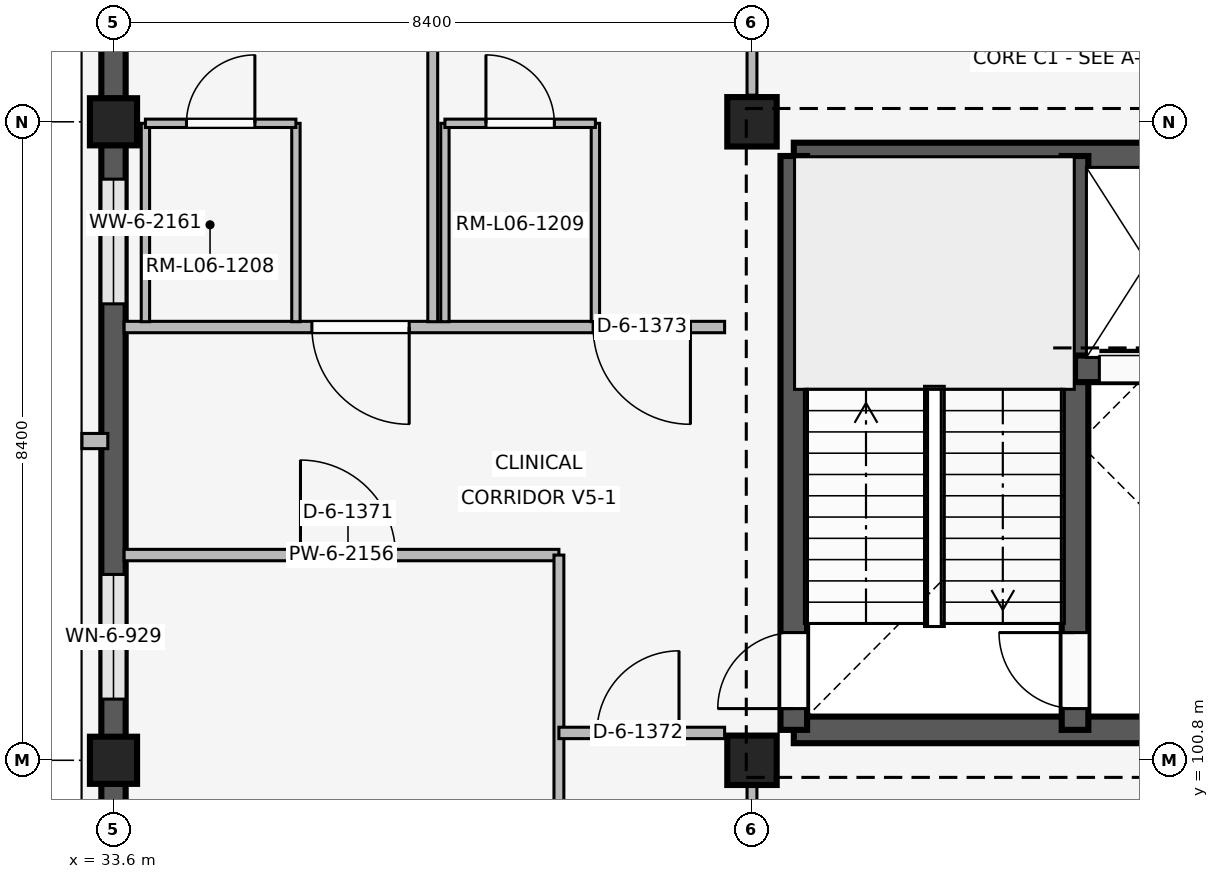
"""IFC4 building model, lengths in metres.
Left out: names, types, materials, properties, quantities, classifications, styles, units other than length and angle.
Written with IfcOpenShell. Run it as: python <this file> out.ifc"""

import sys

from ifc_helpers import new_model, si_unit, direction, frame, frame_2d, origin, origin_2d, place, context, subcontext, project, spatial, rectangle, extrude, element, fill, save


model = new_model("IFC4")
c1 = context("Model", 3, precision=1e-05, world=origin(), true_north=direction((0.0, 1.0)))
c2 = subcontext(c1, "Body", "Model", "MODEL_VIEW")
j1 = project(units=[si_unit("LENGTHUNIT", "METRE"), si_unit("PLANEANGLEUNIT", "RADIAN")], contexts=[c1])
p1 = place(None, origin())
s1 = spatial("IfcSite", under=j1, at=p1, CompositionType="ELEMENT")
p2 = place(p1, origin())
s2 = spatial("IfcBuilding", under=s1, at=p2, CompositionType="ELEMENT")
p3 = place(p2, frame((0.0, 0.0, 24.6)))
s3 = spatial("IfcBuildingStorey", under=s2, at=p3, CompositionType="ELEMENT", Elevation=24.6)
for number, where, z_axis, x_axis in (
    (1, (33.6, 100.8, 0.0), (0.0, 0.0, 1.0), (1.0, 0.0, 0.0)),
    (2, (33.6, 109.2, 0.0), (0.0, 0.0, 1.0), (1.0, 0.0, 0.0)),
):
    element("IfcColumn", number, at=place(p3, frame(where, z_axis=z_axis, x_axis=x_axis)), inside=s3, PredefinedType="COLUMN", context=c2, shape_type="SweptSolid", body=[
        extrude(rectangle(XDim=0.62, YDim=0.62, at=origin_2d()), origin(), (0.0, 0.0, 1.0), 4.2),
    ])
for number, where, z_axis, x_axis in (
    (3, (42.0, 100.8, 0.0), (0.0, 0.0, 1.0), (1.0, 0.0, 0.0)),
    (4, (42.0, 109.2, 0.0), (0.0, 0.0, 1.0), (1.0, 0.0, 0.0)),
):
    element("IfcColumn", number, at=place(p3, frame(where, z_axis=z_axis, x_axis=x_axis)), inside=s3, PredefinedType="COLUMN", context=c2, shape_type="SweptSolid", body=[
        extrude(rectangle(XDim=0.65, YDim=0.65, at=origin_2d()), origin(), (0.0, 0.0, 1.0), 4.2),
    ])
p4 = place(p3, frame((33.6, 92.705, 0.0), z_axis=(0.0, 0.0, 1.0), x_axis=(0.0, 1.0, 0.0)))
e5 = element("IfcWall", 5, at=p4, inside=s3, PredefinedType="SOLIDWALL", context=c2, shape_type="SweptSolid", body=[
    extrude(rectangle(XDim=7.79, YDim=0.32, at=frame_2d((3.895, 0.0))), origin(), (0.0, 0.0, 1.0), 3.34),
])
p5 = place(p4, frame((1.242, 0.0, 0.85)))
e6 = element("IfcOpeningElement", 6, at=p5, cuts=e5, PredefinedType="OPENING", context=c2, shape_type="SweptSolid", body=[
    extrude(rectangle(XDim=1.1, YDim=1.6, at=frame_2d((0.55, 0.8))), frame((0.0, 0.17, 0.0), z_axis=(0.0, -1.0, 0.0), x_axis=(1.0, 0.0, 0.0)), (0.0, 0.0, 1.0), 0.34),
])
p6 = place(p4, frame((5.448, 0.0, 0.85)))
e7 = element("IfcOpeningElement", 7, at=p6, cuts=e5, PredefinedType="OPENING", context=c2, shape_type="SweptSolid", body=[
    extrude(rectangle(XDim=1.1, YDim=1.6, at=frame_2d((0.55, 0.8))), frame((0.0, 0.17, 0.0), z_axis=(0.0, -1.0, 0.0), x_axis=(1.0, 0.0, 0.0)), (0.0, 0.0, 1.0), 0.34),
])
p7 = place(p3, frame((33.6, 101.105, 0.0), z_axis=(0.0, 0.0, 1.0), x_axis=(0.0, 1.0, 0.0)))
e8 = element("IfcWall", 8, at=p7, inside=s3, PredefinedType="SOLIDWALL", context=c2, shape_type="SweptSolid", body=[
    extrude(rectangle(XDim=7.79, YDim=0.32, at=frame_2d((3.895, 0.0))), origin(), (0.0, 0.0, 1.0), 3.34),
])
p8 = place(p7, frame((0.5, 0.0, 0.85)))
e9 = element("IfcOpeningElement", 9, at=p8, cuts=e8, PredefinedType="OPENING", context=c2, shape_type="SweptSolid", body=[
    extrude(rectangle(XDim=1.64, YDim=1.75, at=frame_2d((0.82, 0.875))), frame((0.0, 0.17, 0.0), z_axis=(0.0, -1.0, 0.0), x_axis=(1.0, 0.0, 0.0)), (0.0, 0.0, 1.0), 0.34),
])
p9 = place(p7, frame((5.7, 0.0, 0.85)))
e10 = element("IfcOpeningElement", 10, at=p9, cuts=e8, PredefinedType="OPENING", context=c2, shape_type="SweptSolid", body=[
    extrude(rectangle(XDim=1.64, YDim=1.75, at=frame_2d((0.82, 0.875))), frame((0.0, 0.17, 0.0), z_axis=(0.0, -1.0, 0.0), x_axis=(1.0, 0.0, 0.0)), (0.0, 0.0, 1.0), 0.34),
])
p10 = place(p3, frame((33.525, 105.0, 0.0), z_axis=(0.0, 0.0, 1.0), x_axis=(-1.0, 0.0, 0.0)))
e11 = element("IfcWall", 11, at=p10, inside=s3, PredefinedType="ELEMENTEDWALL", context=c2, shape_type="SweptSolid", body=[
    extrude(rectangle(XDim=0.34, YDim=0.2, at=frame_2d((0.17, 0.0))), origin(), (0.0, 0.0, 1.0), 3.32),
])
p11 = place(p3, frame((33.6, 109.505, 0.0), z_axis=(0.0, 0.0, 1.0), x_axis=(0.0, 1.0, 0.0)))
e12 = element("IfcWall", 12, at=p11, inside=s3, PredefinedType="SOLIDWALL", context=c2, shape_type="SweptSolid", body=[
    extrude(rectangle(XDim=7.79, YDim=0.32, at=frame_2d((3.895, 0.0))), origin(), (0.0, 0.0, 1.0), 3.34),
])
p12 = place(p11, frame((1.002, 0.0, 0.85)))
e13 = element("IfcOpeningElement", 13, at=p12, cuts=e12, PredefinedType="OPENING", context=c2, shape_type="SweptSolid", body=[
    extrude(rectangle(XDim=1.58, YDim=1.7, at=frame_2d((0.79, 0.85))), frame((0.0, 0.17, 0.0), z_axis=(0.0, -1.0, 0.0), x_axis=(1.0, 0.0, 0.0)), (0.0, 0.0, 1.0), 0.34),
])
p13 = place(p11, frame((5.208, 0.0, 0.85)))
e14 = element("IfcOpeningElement", 14, at=p13, cuts=e12, PredefinedType="OPENING", context=c2, shape_type="SweptSolid", body=[
    extrude(rectangle(XDim=1.58, YDim=1.7, at=frame_2d((0.79, 0.85))), frame((0.0, 0.17, 0.0), z_axis=(0.0, -1.0, 0.0), x_axis=(1.0, 0.0, 0.0)), (0.0, 0.0, 1.0), 0.34),
])
p14 = place(p3, frame((42.55, 101.2, 0.0), z_axis=(0.0, 0.0, 1.0), x_axis=(1.0, 0.0, 0.0)))
e15 = element("IfcWall", 15, at=p14, inside=s3, PredefinedType="SHEAR", context=c2, shape_type="SweptSolid", body=[
    extrude(rectangle(XDim=7.5, YDim=0.35, at=frame_2d((3.75, 0.0))), origin(), (0.0, 0.0, 1.0), 3.92),
])
p15 = place(p14, frame((4.85, 0.0, 0.0)))
e16 = element("IfcOpeningElement", 16, at=p15, cuts=e15, PredefinedType="OPENING", context=c2, shape_type="SweptSolid", body=[
    extrude(rectangle(XDim=1.2, YDim=2.2, at=frame_2d((0.6, 1.1))), frame((0.0, 0.185, 0.0), z_axis=(0.0, -1.0, 0.0), x_axis=(1.0, 0.0, 0.0)), (0.0, 0.0, 1.0), 0.37),
])
p16 = place(p3, frame((42.55, 108.75, 0.0), z_axis=(0.0, 0.0, 1.0), x_axis=(1.0, 0.0, 0.0)))
e17 = element("IfcWall", 17, at=p16, inside=s3, PredefinedType="SHEAR", context=c2, shape_type="SweptSolid", body=[
    extrude(rectangle(XDim=7.5, YDim=0.35, at=frame_2d((3.75, 0.0))), origin(), (0.0, 0.0, 1.0), 3.92),
])
p17 = place(p3, frame((42.55, 101.2, 0.0), z_axis=(0.0, 0.0, 1.0), x_axis=(0.0, 1.0, 0.0)))
e18 = element("IfcWall", 18, at=p17, inside=s3, PredefinedType="SHEAR", context=c2, shape_type="SweptSolid", body=[
    extrude(rectangle(XDim=7.55, YDim=0.35, at=frame_2d((3.775, 0.0))), origin(), (0.0, 0.0, 1.0), 3.92),
])
p18 = place(p17, frame((0.28, 0.0, 0.0)))
e19 = element("IfcOpeningElement", 19, at=p18, cuts=e18, PredefinedType="OPENING", context=c2, shape_type="SweptSolid", body=[
    extrude(rectangle(XDim=1.0, YDim=2.15, at=frame_2d((0.5, 1.075))), frame((0.0, 0.185, 0.0), z_axis=(0.0, -1.0, 0.0), x_axis=(1.0, 0.0, 0.0)), (0.0, 0.0, 1.0), 0.37),
])
p19 = place(p3, frame((46.25, 101.2, 0.0), z_axis=(0.0, 0.0, 1.0), x_axis=(0.0, 1.0, 0.0)))
e20 = element("IfcWall", 20, at=p19, inside=s3, PredefinedType="SHEAR", context=c2, shape_type="SweptSolid", body=[
    extrude(rectangle(XDim=7.55, YDim=0.35, at=frame_2d((3.775, 0.0))), origin(), (0.0, 0.0, 1.0), 3.92),
])
p20 = place(p19, frame((0.28, 0.0, 0.0)))
e21 = element("IfcOpeningElement", 21, at=p20, cuts=e20, PredefinedType="OPENING", context=c2, shape_type="SweptSolid", body=[
    extrude(rectangle(XDim=1.0, YDim=2.15, at=frame_2d((0.5, 1.075))), frame((0.0, 0.185, 0.0), z_axis=(0.0, -1.0, 0.0), x_axis=(1.0, 0.0, 0.0)), (0.0, 0.0, 1.0), 0.37),
])
p21 = place(p3, frame((46.25, 105.95, 0.0), z_axis=(0.0, 0.0, 1.0), x_axis=(1.0, 0.0, 0.0)))
e22 = element("IfcWall", 22, at=p21, inside=s3, PredefinedType="SHEAR", context=c2, shape_type="SweptSolid", body=[
    extrude(rectangle(XDim=3.8, YDim=0.35, at=frame_2d((1.9, 0.0))), origin(), (0.0, 0.0, 1.0), 3.92),
])
p22 = place(p21, frame((0.32, 0.0, 0.0)))
e23 = element("IfcOpeningElement", 23, at=p22, cuts=e22, PredefinedType="OPENING", context=c2, shape_type="SweptSolid", body=[
    extrude(rectangle(XDim=1.35, YDim=2.25, at=frame_2d((0.675, 1.125))), frame((0.0, 0.185, 0.0), z_axis=(0.0, -1.0, 0.0), x_axis=(1.0, 0.0, 0.0)), (0.0, 0.0, 1.0), 0.37),
])
p23 = place(p21, frame((2.04, 0.0, 0.0)))
e24 = element("IfcOpeningElement", 24, at=p23, cuts=e22, PredefinedType="OPENING", context=c2, shape_type="SweptSolid", body=[
    extrude(rectangle(XDim=1.4, YDim=2.25, at=frame_2d((0.7, 1.125))), frame((0.0, 0.185, 0.0), z_axis=(0.0, -1.0, 0.0), x_axis=(1.0, 0.0, 0.0)), (0.0, 0.0, 1.0), 0.37),
])
p24 = place(p3, frame((33.74, 103.5, 0.0), z_axis=(0.0, 0.0, 1.0), x_axis=(1.0, 0.0, 0.0)))
e25 = element("IfcWall", 25, at=p24, inside=s3, PredefinedType="PARTITIONING", context=c2, shape_type="SweptSolid", body=[
    extrude(rectangle(XDim=5.72, YDim=0.15, at=frame_2d((2.86, 0.0))), origin(), (0.0, 0.0, 1.0), 3.32),
])
p25 = place(p24, frame((2.32, 0.0, 0.0)))
e26 = element("IfcOpeningElement", 26, at=p25, cuts=e25, PredefinedType="OPENING", context=c2, shape_type="SweptSolid", body=[
    extrude(rectangle(XDim=1.25, YDim=2.2, at=frame_2d((0.625, 1.1))), frame((0.0, 0.085, 0.0), z_axis=(0.0, -1.0, 0.0), x_axis=(1.0, 0.0, 0.0)), (0.0, 0.0, 1.0), 0.17),
])
p26 = place(p3, frame((39.46, 92.56, 0.0), z_axis=(0.0, 0.0, 1.0), x_axis=(0.0, 1.0, 0.0)))
e27 = element("IfcWall", 27, at=p26, inside=s3, PredefinedType="PARTITIONING", context=c2, shape_type="SweptSolid", body=[
    extrude(rectangle(XDim=10.94, YDim=0.13, at=frame_2d((5.47, 0.0))), origin(), (0.0, 0.0, 1.0), 3.32),
])
p27 = place(p3, frame((39.46, 101.16, 0.0), z_axis=(0.0, 0.0, 1.0), x_axis=(1.0, 0.0, 0.0)))
e28 = element("IfcWall", 28, at=p27, inside=s3, PredefinedType="PARTITIONING", context=c2, shape_type="SweptSolid", body=[
    extrude(rectangle(XDim=2.18, YDim=0.15, at=frame_2d((1.09, 0.0))), origin(), (0.0, 0.0, 1.0), 3.32),
])
p28 = place(p27, frame((0.5, 0.0, 0.0)))
e29 = element("IfcOpeningElement", 29, at=p28, cuts=e28, PredefinedType="OPENING", context=c2, shape_type="SweptSolid", body=[
    extrude(rectangle(XDim=1.08, YDim=2.15, at=frame_2d((0.54, 1.075))), frame((0.0, 0.085, 0.0), z_axis=(0.0, -1.0, 0.0), x_axis=(1.0, 0.0, 0.0)), (0.0, 0.0, 1.0), 0.17),
])
p29 = place(p3, frame((41.64, 106.5, 0.0), z_axis=(0.0, 0.0, 1.0), x_axis=(-1.0, 0.0, 0.0)))
e30 = element("IfcWall", 30, at=p29, inside=s3, PredefinedType="PARTITIONING", context=c2, shape_type="SweptSolid", body=[
    extrude(rectangle(XDim=7.9, YDim=0.15, at=frame_2d((3.95, 0.0))), origin(), (0.0, 0.0, 1.0), 3.32),
])
p30 = place(p29, frame((0.45, 0.0, 0.0)))
e31 = element("IfcOpeningElement", 31, at=p30, cuts=e30, PredefinedType="OPENING", context=c2, shape_type="SweptSolid", body=[
    extrude(rectangle(XDim=1.28, YDim=2.2, at=frame_2d((0.64, 1.1))), frame((0.0, 0.085, 0.0), z_axis=(0.0, -1.0, 0.0), x_axis=(1.0, 0.0, 0.0)), (0.0, 0.0, 1.0), 0.17),
])
p31 = place(p29, frame((4.15, 0.0, 0.0)))
e32 = element("IfcOpeningElement", 32, at=p31, cuts=e30, PredefinedType="OPENING", context=c2, shape_type="SweptSolid", body=[
    extrude(rectangle(XDim=1.28, YDim=2.2, at=frame_2d((0.64, 1.1))), frame((0.0, 0.085, 0.0), z_axis=(0.0, -1.0, 0.0), x_axis=(1.0, 0.0, 0.0)), (0.0, 0.0, 1.0), 0.17),
])
p32 = place(p3, frame((37.8, 106.57, 0.0), z_axis=(0.0, 0.0, 1.0), x_axis=(0.0, 1.0, 0.0)))
e33 = element("IfcWall", 33, at=p32, inside=s3, PredefinedType="PARTITIONING", context=c2, shape_type="SweptSolid", body=[
    extrude(rectangle(XDim=10.93, YDim=0.13, at=frame_2d((5.465, 0.0))), origin(), (0.0, 0.0, 1.0), 3.32),
])
for number, where, z_axis, x_axis in (
    (34, (34.02, 106.57, 0.0), (0.0, 0.0, 1.0), (0.0, 1.0, 0.0)),
    (35, (36.0, 106.57, 0.0), (0.0, 0.0, 1.0), (0.0, 1.0, 0.0)),
):
    element("IfcWall", number, at=place(p3, frame(where, z_axis=z_axis, x_axis=x_axis)), inside=s3, PredefinedType="PARTITIONING", context=c2, shape_type="SweptSolid", body=[
        extrude(rectangle(XDim=2.61, YDim=0.11, at=frame_2d((1.305, 0.0))), origin(), (0.0, 0.0, 1.0), 3.32),
    ])
p33 = place(p3, frame((34.02, 109.18, 0.0), z_axis=(0.0, 0.0, 1.0), x_axis=(1.0, 0.0, 0.0)))
e36 = element("IfcWall", 36, at=p33, inside=s3, PredefinedType="PARTITIONING", context=c2, shape_type="SweptSolid", body=[
    extrude(rectangle(XDim=1.98, YDim=0.11, at=frame_2d((0.99, 0.0))), origin(), (0.0, 0.0, 1.0), 3.32),
])
p34 = place(p33, frame((0.54, 0.0, 0.0)))
e37 = element("IfcOpeningElement", 37, at=p34, cuts=e36, PredefinedType="OPENING", context=c2, shape_type="SweptSolid", body=[
    extrude(rectangle(XDim=0.9, YDim=2.1, at=frame_2d((0.45, 1.05))), frame((0.0, 0.065, 0.0), z_axis=(0.0, -1.0, 0.0), x_axis=(1.0, 0.0, 0.0)), (0.0, 0.0, 1.0), 0.13),
])
for number, where, z_axis, x_axis in (
    (38, (37.96, 106.57, 0.0), (0.0, 0.0, 1.0), (0.0, 1.0, 0.0)),
    (39, (39.94, 106.57, 0.0), (0.0, 0.0, 1.0), (0.0, 1.0, 0.0)),
):
    element("IfcWall", number, at=place(p3, frame(where, z_axis=z_axis, x_axis=x_axis)), inside=s3, PredefinedType="PARTITIONING", context=c2, shape_type="SweptSolid", body=[
        extrude(rectangle(XDim=2.61, YDim=0.11, at=frame_2d((1.305, 0.0))), origin(), (0.0, 0.0, 1.0), 3.32),
    ])
p35 = place(p3, frame((37.96, 109.18, 0.0), z_axis=(0.0, 0.0, 1.0), x_axis=(1.0, 0.0, 0.0)))
e40 = element("IfcWall", 40, at=p35, inside=s3, PredefinedType="PARTITIONING", context=c2, shape_type="SweptSolid", body=[
    extrude(rectangle(XDim=1.98, YDim=0.11, at=frame_2d((0.99, 0.0))), origin(), (0.0, 0.0, 1.0), 3.32),
])
p36 = place(p35, frame((0.54, 0.0, 0.0)))
e41 = element("IfcOpeningElement", 41, at=p36, cuts=e40, PredefinedType="OPENING", context=c2, shape_type="SweptSolid", body=[
    extrude(rectangle(XDim=0.9, YDim=2.1, at=frame_2d((0.45, 1.05))), frame((0.0, 0.065, 0.0), z_axis=(0.0, -1.0, 0.0), x_axis=(1.0, 0.0, 0.0)), (0.0, 0.0, 1.0), 0.13),
])
p37 = place(p3, frame((42.0, 92.54, 0.0), z_axis=(0.0, 0.0, 1.0), x_axis=(0.0, 1.0, 0.0)))
e42 = element("IfcWall", 42, at=p37, inside=s3, PredefinedType="PARTITIONING", context=c2, shape_type="SweptSolid", body=[
    extrude(rectangle(XDim=8.21, YDim=0.13, at=frame_2d((4.105, 0.0))), origin(), (0.0, 0.0, 1.0), 3.32),
])
p38 = place(p37, frame((3.64, 0.0, 0.0)))
e43 = element("IfcOpeningElement", 43, at=p38, cuts=e42, PredefinedType="OPENING", context=c2, shape_type="SweptSolid", body=[
    extrude(rectangle(XDim=1.08, YDim=2.15, at=frame_2d((0.54, 1.075))), frame((0.0, 0.075, 0.0), z_axis=(0.0, -1.0, 0.0), x_axis=(1.0, 0.0, 0.0)), (0.0, 0.0, 1.0), 0.15),
])
p39 = place(p3, frame((42.0, 109.55, 0.0), z_axis=(0.0, 0.0, 1.0), x_axis=(0.0, 1.0, 0.0)))
e44 = element("IfcWall", 44, at=p39, inside=s3, PredefinedType="PARTITIONING", context=c2, shape_type="SweptSolid", body=[
    extrude(rectangle(XDim=7.91, YDim=0.13, at=frame_2d((3.955, 0.0))), origin(), (0.0, 0.0, 1.0), 3.32),
])
p40 = place(p39, frame((3.4, 0.0, 0.0)))
e45 = element("IfcOpeningElement", 45, at=p40, cuts=e44, PredefinedType="OPENING", context=c2, shape_type="SweptSolid", body=[
    extrude(rectangle(XDim=1.05, YDim=2.2, at=frame_2d((0.525, 1.1))), frame((0.0, 0.075, 0.0), z_axis=(0.0, -1.0, 0.0), x_axis=(1.0, 0.0, 0.0)), (0.0, 0.0, 1.0), 0.15),
])
p41 = place(p8, origin())
e46 = element("IfcWindow", 46, at=p41, inside=s3, PartitioningType="SINGLE_PANEL", PredefinedType="WINDOW", context=c2, shape_type="SweptSolid", body=[
    extrude(rectangle(XDim=1.64, YDim=1.75, at=frame_2d((0.82, 0.875))), frame((0.0, 0.03, 0.0), z_axis=(0.0, -1.0, 0.0), x_axis=(1.0, 0.0, 0.0)), (0.0, 0.0, 1.0), 0.06),
])
fill(e9, e46)
p42 = place(p9, origin())
e47 = element("IfcWindow", 47, at=p42, inside=s3, PartitioningType="SINGLE_PANEL", PredefinedType="WINDOW", context=c2, shape_type="SweptSolid", body=[
    extrude(rectangle(XDim=1.64, YDim=1.75, at=frame_2d((0.82, 0.875))), frame((0.0, 0.03, 0.0), z_axis=(0.0, -1.0, 0.0), x_axis=(1.0, 0.0, 0.0)), (0.0, 0.0, 1.0), 0.06),
])
fill(e10, e47)
p43 = place(p18, origin())
e48 = element("IfcDoor", 48, at=p43, inside=s3, OperationType="SINGLE_SWING_LEFT", PredefinedType="DOOR", context=c2, shape_type="SweptSolid", body=[
    extrude(rectangle(XDim=1.0, YDim=2.15, at=frame_2d((0.5, 1.075))), frame((0.0, 0.025, 0.0), z_axis=(0.0, -1.0, 0.0), x_axis=(1.0, 0.0, 0.0)), (0.0, 0.0, 1.0), 0.05),
])
fill(e19, e48)
p44 = place(p20, origin())
e49 = element("IfcDoor", 49, at=p44, inside=s3, OperationType="SINGLE_SWING_RIGHT", PredefinedType="DOOR", context=c2, shape_type="SweptSolid", body=[
    extrude(rectangle(XDim=1.0, YDim=2.15, at=frame_2d((0.5, 1.075))), frame((0.0, 0.025, 0.0), z_axis=(0.0, -1.0, 0.0), x_axis=(1.0, 0.0, 0.0)), (0.0, 0.0, 1.0), 0.05),
])
fill(e21, e49)
p45 = place(p22, origin())
e50 = element("IfcDoor", 50, at=p45, inside=s3, OperationType="SLIDING_TO_LEFT", PredefinedType="DOOR", context=c2, shape_type="SweptSolid", body=[
    extrude(rectangle(XDim=1.35, YDim=2.25, at=frame_2d((0.675, 1.125))), frame((0.0, 0.025, 0.0), z_axis=(0.0, -1.0, 0.0), x_axis=(1.0, 0.0, 0.0)), (0.0, 0.0, 1.0), 0.05),
])
fill(e23, e50)
p46 = place(p25, origin())
e51 = element("IfcDoor", 51, at=p46, inside=s3, OperationType="SINGLE_SWING_LEFT", PredefinedType="DOOR", context=c2, shape_type="SweptSolid", body=[
    extrude(rectangle(XDim=1.25, YDim=2.2, at=frame_2d((0.625, 1.1))), frame((0.0, 0.025, 0.0), z_axis=(0.0, -1.0, 0.0), x_axis=(1.0, 0.0, 0.0)), (0.0, 0.0, 1.0), 0.05),
])
fill(e26, e51)
p47 = place(p28, origin())
e52 = element("IfcDoor", 52, at=p47, inside=s3, OperationType="SINGLE_SWING_RIGHT", PredefinedType="DOOR", context=c2, shape_type="SweptSolid", body=[
    extrude(rectangle(XDim=1.08, YDim=2.15, at=frame_2d((0.54, 1.075))), frame((0.0, 0.025, 0.0), z_axis=(0.0, -1.0, 0.0), x_axis=(1.0, 0.0, 0.0)), (0.0, 0.0, 1.0), 0.05),
])
fill(e29, e52)
p48 = place(p30, origin())
e53 = element("IfcDoor", 53, at=p48, inside=s3, OperationType="SINGLE_SWING_LEFT", PredefinedType="DOOR", context=c2, shape_type="SweptSolid", body=[
    extrude(rectangle(XDim=1.28, YDim=2.2, at=frame_2d((0.64, 1.1))), frame((0.0, 0.025, 0.0), z_axis=(0.0, -1.0, 0.0), x_axis=(1.0, 0.0, 0.0)), (0.0, 0.0, 1.0), 0.05),
])
fill(e31, e53)
p49 = place(p31, origin())
e54 = element("IfcDoor", 54, at=p49, inside=s3, OperationType="SINGLE_SWING_LEFT", PredefinedType="DOOR", context=c2, shape_type="SweptSolid", body=[
    extrude(rectangle(XDim=1.28, YDim=2.2, at=frame_2d((0.64, 1.1))), frame((0.0, 0.025, 0.0), z_axis=(0.0, -1.0, 0.0), x_axis=(1.0, 0.0, 0.0)), (0.0, 0.0, 1.0), 0.05),
])
fill(e32, e54)
p50 = place(p34, origin())
e55 = element("IfcDoor", 55, at=p50, inside=s3, OperationType="SINGLE_SWING_RIGHT", PredefinedType="DOOR", context=c2, shape_type="SweptSolid", body=[
    extrude(rectangle(XDim=0.9, YDim=2.1, at=frame_2d((0.45, 1.05))), frame((0.0, 0.025, 0.0), z_axis=(0.0, -1.0, 0.0), x_axis=(1.0, 0.0, 0.0)), (0.0, 0.0, 1.0), 0.05),
])
fill(e37, e55)
p51 = place(p36, origin())
e56 = element("IfcDoor", 56, at=p51, inside=s3, OperationType="SINGLE_SWING_LEFT", PredefinedType="DOOR", context=c2, shape_type="SweptSolid", body=[
    extrude(rectangle(XDim=0.9, YDim=2.1, at=frame_2d((0.45, 1.05))), frame((0.0, 0.025, 0.0), z_axis=(0.0, -1.0, 0.0), x_axis=(1.0, 0.0, 0.0)), (0.0, 0.0, 1.0), 0.05),
])
fill(e41, e56)
save(model, sys.argv[1])
